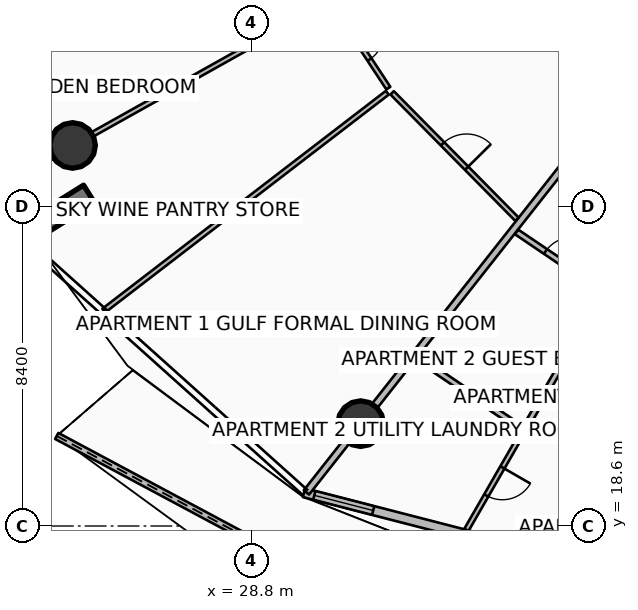
"""IFC4 building model, lengths in metres.
Left out: names, types, materials, properties, quantities, classifications, styles, units other than length and angle.
Written with IfcOpenShell. Run it as: python <this file> out.ifc"""

import sys

from ifc_helpers import new_model, si_unit, direction, frame, frame_2d, origin, origin_2d, place, context, subcontext, project, spatial, polyline, rectangle, circle, outline, extrude, element, fill, save


model = new_model("IFC4")
c1 = context("Model", 3, precision=1e-05, world=origin(), true_north=direction((0.0, 1.0)))
c2 = subcontext(c1, "Body", "Model", "MODEL_VIEW")
j1 = project(units=[si_unit("LENGTHUNIT", "METRE"), si_unit("PLANEANGLEUNIT", "RADIAN")], contexts=[c1])
p1 = place(None, origin())
s1 = spatial("IfcSite", under=j1, at=p1, CompositionType="ELEMENT")
p2 = place(p1, origin())
s2 = spatial("IfcBuilding", under=s1, at=p2, CompositionType="ELEMENT")
p3 = place(p2, frame((0.0, 0.0, 90.15)))
s3 = spatial("IfcBuildingStorey", under=s2, at=p3, CompositionType="ELEMENT", Elevation=90.15)
p4 = place(p3, frame((24.531, 27.335, 0.0), z_axis=(0.0, 0.0, 1.0), x_axis=(-0.848053161125, -0.529911158502, 0.0)))
e1 = element("IfcWall", 1, at=p4, inside=s3, PredefinedType="SOLIDWALL", context=c2, shape_type="SweptSolid", body=[
    extrude(rectangle(XDim=3.5, YDim=0.55, at=frame_2d((1.75, 0.0))), origin(), (0.0, 0.0, 1.0), 3.75),
])
for number, where, z_axis, x_axis in (
    (2, (24.097, 28.614, 0.0), (0.0, 0.0, 1.0), (1.0, 0.0, 0.0)),
    (3, (31.677, 21.294, 0.0), (0.0, 0.0, 1.0), (1.0, 0.0, 0.0)),
):
    element("IfcColumn", number, at=place(p3, frame(where, z_axis=z_axis, x_axis=x_axis)), inside=s3, PredefinedType="COLUMN", context=c2, shape_type="SweptSolid", body=[
        extrude(circle(Radius=0.6, at=origin_2d()), origin(), (0.0, 0.0, 1.0), 3.5),
    ])
p5 = place(p3, frame((23.679, 20.97, 0.0), z_axis=(0.0, 0.0, 1.0), x_axis=(0.881754939151, -0.471707777425, 0.0)))
e4 = element("IfcWall", 4, at=p5, inside=s3, PredefinedType="PARAPET", context=c2, shape_type="SweptSolid", body=[
    extrude(outline(polyline([(0.0, 0.0), (12.005, 0.0), (12.005, 1.632), (6.002, 1.798), (0.0, 1.86), (0.0, 0.0)])), frame((0.0, 0.09, 0.0), z_axis=(0.0, -1.0, 0.0), x_axis=(1.0, 0.0, 0.0)), (0.0, 0.0, 1.0), 0.18),
])
p6 = place(p3, frame((30.186, 19.477, 0.0), z_axis=(0.0, 0.0, 1.0), x_axis=(0.968356180858, -0.249572248045, 0.0)))
e5 = element("IfcWall", 5, at=p6, inside=s3, PredefinedType="SOLIDWALL", context=c2, shape_type="SweptSolid", body=[
    extrude(rectangle(XDim=11.084, YDim=0.24, at=frame_2d((5.542, 0.0))), origin(), (0.0, 0.0, 1.0), 2.45),
])
p7 = place(p6, frame((8.865, 0.0, 0.0)))
e6 = element("IfcOpeningElement", 6, at=p7, cuts=e5, PredefinedType="OPENING", context=c2, shape_type="SweptSolid", body=[
    extrude(rectangle(XDim=1.45, YDim=2.15, at=frame_2d((0.725, 1.075))), frame((0.0, 0.13, 0.0), z_axis=(0.0, -1.0, 0.0), x_axis=(1.0, 0.0, 0.0)), (0.0, 0.0, 1.0), 0.26),
])
p8 = place(p6, frame((0.28, 0.0, 0.65)))
e7 = element("IfcOpeningElement", 7, at=p8, cuts=e5, PredefinedType="OPENING", context=c2, shape_type="SweptSolid", body=[
    extrude(rectangle(XDim=1.6, YDim=1.5, at=frame_2d((0.8, 0.75))), frame((0.0, 0.13, 0.0), z_axis=(0.0, -1.0, 0.0), x_axis=(1.0, 0.0, 0.0)), (0.0, 0.0, 1.0), 0.26),
])
p9 = place(p3, frame((39.575, 31.314, 0.0), z_axis=(0.0, 0.0, 1.0), x_axis=(-0.619083417853, -0.785325233098, 0.0)))
e8 = element("IfcWall", 8, at=p9, inside=s3, PredefinedType="PARTITIONING", context=c2, shape_type="SweptSolid", body=[
    extrude(rectangle(XDim=15.063, YDim=0.18, at=frame_2d((7.532, 0.0))), origin(), (0.0, 0.0, 1.0), 2.94),
])
p10 = place(p3, frame((30.804, 32.37, 0.0), z_axis=(0.0, 0.0, 1.0), x_axis=(-0.872500902675, -0.488612499668, 0.0)))
e9 = element("IfcWall", 9, at=p10, inside=s3, PredefinedType="PARTITIONING", context=c2, shape_type="SweptSolid", body=[
    extrude(rectangle(XDim=9.77, YDim=0.125, at=frame_2d((4.885, 0.0))), origin(), (0.0, 0.0, 1.0), 2.94),
])
p11 = place(p3, frame((32.378, 30.0, 0.0), z_axis=(0.0, 0.0, 1.0), x_axis=(-0.793018359225, -0.609197736315, 0.0)))
e10 = element("IfcWall", 10, at=p11, inside=s3, PredefinedType="PARTITIONING", context=c2, shape_type="SweptSolid", body=[
    extrude(rectangle(XDim=9.409, YDim=0.125, at=frame_2d((4.704, 0.0))), origin(), (0.0, 0.0, 1.0), 2.94),
])
p12 = place(p3, frame((30.946, 32.335, 0.0), z_axis=(0.0, 0.0, 1.0), x_axis=(0.55037901545, -0.83491492941, 0.0)))
e11 = element("IfcWall", 11, at=p12, inside=s3, PredefinedType="PARTITIONING", context=c2, shape_type="SweptSolid", body=[
    extrude(rectangle(XDim=2.651, YDim=0.125, at=frame_2d((1.326, 0.0))), origin(), (0.0, 0.0, 1.0), 2.94),
])
p13 = place(p12, frame((0.901, 0.0, 0.0)))
e12 = element("IfcOpeningElement", 12, at=p13, cuts=e11, PredefinedType="OPENING", context=c2, shape_type="SweptSolid", body=[
    extrude(rectangle(XDim=0.85, YDim=2.06, at=frame_2d((0.425, 1.03))), frame((0.0, 0.073, 0.0), z_axis=(0.0, -1.0, 0.0), x_axis=(1.0, 0.0, 0.0)), (0.0, 0.0, 1.0), 0.145),
])
p14 = place(p3, frame((32.506, 29.998, 0.0), z_axis=(0.0, 0.0, 1.0), x_axis=(0.702626830151, -0.711558527144, 0.0)))
e13 = element("IfcWall", 13, at=p14, inside=s3, PredefinedType="PARTITIONING", context=c2, shape_type="SweptSolid", body=[
    extrude(rectangle(XDim=4.674, YDim=0.125, at=frame_2d((2.337, 0.0))), origin(), (0.0, 0.0, 1.0), 2.94),
])
p15 = place(p14, frame((1.887, 0.0, 0.0)))
e14 = element("IfcOpeningElement", 14, at=p15, cuts=e13, PredefinedType="OPENING", context=c2, shape_type="SweptSolid", body=[
    extrude(rectangle(XDim=0.9, YDim=2.08, at=frame_2d((0.45, 1.04))), frame((0.0, 0.073, 0.0), z_axis=(0.0, -1.0, 0.0), x_axis=(1.0, 0.0, 0.0)), (0.0, 0.0, 1.0), 0.145),
])
p16 = place(p3, frame((35.78, 26.338, 0.0), z_axis=(0.0, 0.0, 1.0), x_axis=(0.828087409359, -0.560599003264, 0.0)))
e15 = element("IfcWall", 15, at=p16, inside=s3, PredefinedType="PARTITIONING", context=c2, shape_type="SweptSolid", body=[
    extrude(rectangle(XDim=2.687, YDim=0.15, at=frame_2d((1.344, 0.0))), origin(), (0.0, 0.0, 1.0), 2.94),
])
p17 = place(p16, frame((0.918, 0.0, 0.0)))
e16 = element("IfcOpeningElement", 16, at=p17, cuts=e15, PredefinedType="OPENING", context=c2, shape_type="SweptSolid", body=[
    extrude(rectangle(XDim=0.85, YDim=2.06, at=frame_2d((0.425, 1.03))), frame((0.0, 0.085, 0.0), z_axis=(0.0, -1.0, 0.0), x_axis=(1.0, 0.0, 0.0)), (0.0, 0.0, 1.0), 0.17),
])
p18 = place(p3, frame((33.167, 23.024, 0.0), z_axis=(0.0, 0.0, 1.0), x_axis=(0.828134847694, -0.560528923459, 0.0)))
e17 = element("IfcWall", 17, at=p18, inside=s3, PredefinedType="PARTITIONING", context=c2, shape_type="SweptSolid", body=[
    extrude(rectangle(XDim=3.298, YDim=0.15, at=frame_2d((1.649, 0.0))), origin(), (0.0, 0.0, 1.0), 2.94),
])
p19 = place(p3, frame((38.035, 24.703, 0.0), z_axis=(0.0, 0.0, 1.0), x_axis=(-0.499227984822, -0.866470668384, 0.0)))
e18 = element("IfcWall", 18, at=p19, inside=s3, PredefinedType="PARTITIONING", context=c2, shape_type="SweptSolid", body=[
    extrude(rectangle(XDim=4.09, YDim=0.15, at=frame_2d((2.045, 0.0))), origin(), (0.0, 0.0, 1.0), 2.94),
])
p20 = place(p3, frame((35.928, 21.047, 0.0), z_axis=(0.0, 0.0, 1.0), x_axis=(-0.499221481069, -0.866474415571, 0.0)))
e19 = element("IfcWall", 19, at=p20, inside=s3, PredefinedType="PARTITIONING", context=c2, shape_type="SweptSolid", body=[
    extrude(rectangle(XDim=2.94, YDim=0.125, at=frame_2d((1.47, 0.0))), origin(), (0.0, 0.0, 1.0), 2.94),
])
p21 = place(p20, frame((1.045, 0.0, 0.0)))
e20 = element("IfcOpeningElement", 20, at=p21, cuts=e19, PredefinedType="OPENING", context=c2, shape_type="SweptSolid", body=[
    extrude(rectangle(XDim=0.85, YDim=2.06, at=frame_2d((0.425, 1.03))), frame((0.0, 0.073, 0.0), z_axis=(0.0, -1.0, 0.0), x_axis=(1.0, 0.0, 0.0)), (0.0, 0.0, 1.0), 0.145),
])
p22 = place(p8, origin())
e21 = element("IfcWindow", 21, at=p22, inside=s3, PartitioningType="SINGLE_PANEL", PredefinedType="WINDOW", context=c2, shape_type="SweptSolid", body=[
    extrude(rectangle(XDim=1.6, YDim=1.5, at=frame_2d((0.8, 0.75))), frame((0.0, 0.03, 0.0), z_axis=(0.0, -1.0, 0.0), x_axis=(1.0, 0.0, 0.0)), (0.0, 0.0, 1.0), 0.06),
])
fill(e7, e21)
p23 = place(p13, origin())
e22 = element("IfcDoor", 22, at=p23, inside=s3, OperationType="SINGLE_SWING_LEFT", PredefinedType="DOOR", context=c2, shape_type="SweptSolid", body=[
    extrude(rectangle(XDim=0.85, YDim=2.06, at=frame_2d((0.425, 1.03))), frame((0.0, 0.025, 0.0), z_axis=(0.0, -1.0, 0.0), x_axis=(1.0, 0.0, 0.0)), (0.0, 0.0, 1.0), 0.05),
])
fill(e12, e22)
p24 = place(p15, origin())
e23 = element("IfcDoor", 23, at=p24, inside=s3, OperationType="SINGLE_SWING_RIGHT", PredefinedType="DOOR", context=c2, shape_type="SweptSolid", body=[
    extrude(rectangle(XDim=0.9, YDim=2.08, at=frame_2d((0.45, 1.04))), frame((0.0, 0.025, 0.0), z_axis=(0.0, -1.0, 0.0), x_axis=(1.0, 0.0, 0.0)), (0.0, 0.0, 1.0), 0.05),
])
fill(e14, e23)
p25 = place(p17, origin())
e24 = element("IfcDoor", 24, at=p25, inside=s3, OperationType="SINGLE_SWING_RIGHT", PredefinedType="DOOR", context=c2, shape_type="SweptSolid", body=[
    extrude(rectangle(XDim=0.85, YDim=2.06, at=frame_2d((0.425, 1.03))), frame((0.0, 0.025, 0.0), z_axis=(0.0, -1.0, 0.0), x_axis=(1.0, 0.0, 0.0)), (0.0, 0.0, 1.0), 0.05),
])
fill(e16, e24)
p26 = place(p21, origin())
e25 = element("IfcDoor", 25, at=p26, inside=s3, OperationType="SINGLE_SWING_LEFT", PredefinedType="DOOR", context=c2, shape_type="SweptSolid", body=[
    extrude(rectangle(XDim=0.85, YDim=2.06, at=frame_2d((0.425, 1.03))), frame((0.0, 0.025, 0.0), z_axis=(0.0, -1.0, 0.0), x_axis=(1.0, 0.0, 0.0)), (0.0, 0.0, 1.0), 0.05),
])
fill(e20, e25)
save(model, sys.argv[1])
